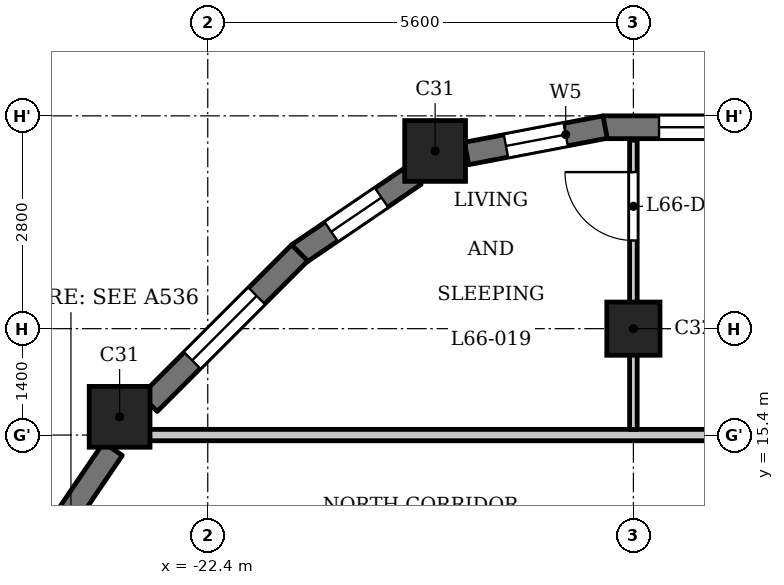
"""IFC4 building model, lengths in metres.
Left out: names, types, materials, properties, quantities, classifications, styles, units other than length and angle.
Written with IfcOpenShell. Run it as: python <this file> out.ifc"""

import sys

from ifc_helpers import new_model, si_unit, direction, frame, frame_2d, origin, origin_2d, place, context, subcontext, project, spatial, rectangle, extrude, element, fill, save


model = new_model("IFC4")
c1 = context("Model", 3, precision=1e-05, world=origin(), true_north=direction((0.0, 1.0)))
c2 = subcontext(c1, "Body", "Model", "MODEL_VIEW")
j1 = project(units=[si_unit("LENGTHUNIT", "METRE"), si_unit("PLANEANGLEUNIT", "RADIAN")], contexts=[c1])
p1 = place(None, origin())
s1 = spatial("IfcSite", under=j1, at=p1, CompositionType="ELEMENT")
p2 = place(p1, origin())
s2 = spatial("IfcBuilding", under=s1, at=p2, CompositionType="ELEMENT")
p3 = place(p2, frame((0.0, 0.0, 255.7)))
s3 = spatial("IfcBuildingStorey", under=s2, at=p3, CompositionType="ELEMENT", Elevation=255.7)
for number, where, z_axis, x_axis in (
    (1, (-19.409, 19.138, 0.0), (0.0, 0.0, 1.0), (1.0, 0.0, 0.0)),
    (2, (-23.56, 15.64, 0.0), (0.0, 0.0, 1.0), (1.0, 0.0, 0.0)),
):
    element("IfcColumn", number, at=place(p3, frame(where, z_axis=z_axis, x_axis=x_axis)), inside=s3, PredefinedType="COLUMN", context=c2, shape_type="SweptSolid", body=[
        extrude(rectangle(XDim=0.8, YDim=0.8, at=origin_2d()), origin(), (0.0, 0.0, 1.0), 3.5),
    ])
p4 = place(p3, frame((-16.8, 16.8, 0.0), z_axis=(0.0, 0.0, 1.0), x_axis=(1.0, 0.0, 0.0)))
e3 = element("IfcColumn", 3, at=p4, inside=s3, PredefinedType="COLUMN", context=c2, shape_type="SweptSolid", body=[
    extrude(rectangle(XDim=0.7, YDim=0.7, at=origin_2d()), origin(), (0.0, 0.0, 1.0), 3.5),
])
p5 = place(p3, frame((-14.4, 19.45, 0.0), z_axis=(0.0, 0.0, 1.0), x_axis=(-1.0, 0.0, 0.0)))
e4 = element("IfcWall", 4, at=p5, inside=s3, PredefinedType="SOLIDWALL", context=c2, shape_type="SweptSolid", body=[
    extrude(rectangle(XDim=2.8, YDim=0.3, at=frame_2d((1.4, 0.0))), origin(), (0.0, 0.0, 1.0), 2.55),
])
p6 = place(p5, frame((0.262, 0.0, 0.9)))
e5 = element("IfcOpeningElement", 5, at=p6, cuts=e4, PredefinedType="OPENING", context=c2, shape_type="SweptSolid", body=[
    extrude(rectangle(XDim=1.8, YDim=1.25, at=frame_2d((0.9, 0.625))), frame((0.0, 0.16, 0.0), z_axis=(0.0, -1.0, 0.0), x_axis=(1.0, 0.0, 0.0)), (0.0, 0.0, 1.0), 0.32),
])
p7 = place(p3, frame((-17.172, 19.453, 0.0), z_axis=(0.0, 0.0, 1.0), x_axis=(-0.982301706131, -0.187305520826, 0.0)))
e6 = element("IfcWall", 6, at=p7, inside=s3, PredefinedType="SOLIDWALL", context=c2, shape_type="SweptSolid", body=[
    extrude(rectangle(XDim=1.856, YDim=0.3, at=frame_2d((0.928, 0.0))), origin(), (0.0, 0.0, 1.0), 2.55),
])
p8 = place(p7, frame((0.528, 0.0, 0.6)))
e7 = element("IfcOpeningElement", 7, at=p8, cuts=e6, PredefinedType="OPENING", context=c2, shape_type="SweptSolid", body=[
    extrude(rectangle(XDim=0.8, YDim=1.55, at=frame_2d((0.4, 0.775))), frame((0.0, 0.16, 0.0), z_axis=(0.0, -1.0, 0.0), x_axis=(1.0, 0.0, 0.0)), (0.0, 0.0, 1.0), 0.32),
])
p9 = place(p3, frame((-19.678, 18.822, 0.0), z_axis=(0.0, 0.0, 1.0), x_axis=(-0.826997446962, -0.562205676526, 0.0)))
e8 = element("IfcWall", 8, at=p9, inside=s3, PredefinedType="SOLIDWALL", context=c2, shape_type="SweptSolid", body=[
    extrude(rectangle(XDim=1.856, YDim=0.3, at=frame_2d((0.928, 0.0))), origin(), (0.0, 0.0, 1.0), 2.55),
])
p10 = place(p9, frame((0.528, 0.0, 0.6)))
e9 = element("IfcOpeningElement", 9, at=p10, cuts=e8, PredefinedType="OPENING", context=c2, shape_type="SweptSolid", body=[
    extrude(rectangle(XDim=0.8, YDim=1.55, at=frame_2d((0.4, 0.775))), frame((0.0, 0.16, 0.0), z_axis=(0.0, -1.0, 0.0), x_axis=(1.0, 0.0, 0.0)), (0.0, 0.0, 1.0), 0.32),
])
p11 = place(p3, frame((-21.191, 17.797, 0.0), z_axis=(0.0, 0.0, 1.0), x_axis=(-0.707106781187, -0.707106781187, 0.0)))
e10 = element("IfcWall", 10, at=p11, inside=s3, PredefinedType="SOLIDWALL", context=c2, shape_type="SweptSolid", body=[
    extrude(rectangle(XDim=2.8, YDim=0.3, at=frame_2d((1.4, 0.0))), origin(), (0.0, 0.0, 1.0), 2.55),
])
p12 = place(p11, frame((0.8, 0.0, 0.6)))
e11 = element("IfcOpeningElement", 11, at=p12, cuts=e10, PredefinedType="OPENING", context=c2, shape_type="SweptSolid", body=[
    extrude(rectangle(XDim=1.2, YDim=1.55, at=frame_2d((0.6, 0.775))), frame((0.0, 0.16, 0.0), z_axis=(0.0, -1.0, 0.0), x_axis=(1.0, 0.0, 0.0)), (0.0, 0.0, 1.0), 0.32),
])
p13 = place(p3, frame((-23.648, 15.217, 0.0), z_axis=(0.0, 0.0, 1.0), x_axis=(-0.562043265151, -0.827107833416, 0.0)))
e12 = element("IfcWall", 12, at=p13, inside=s3, PredefinedType="SOLIDWALL", context=c2, shape_type="SweptSolid", body=[
    extrude(rectangle(XDim=1.377, YDim=0.3, at=frame_2d((0.688, 0.0))), origin(), (0.0, 0.0, 1.0), 2.55),
])
p14 = place(p3, frame((-23.55, 15.4, 0.0), z_axis=(0.0, 0.0, 1.0), x_axis=(1.0, 0.0, 0.0)))
e13 = element("IfcWall", 13, at=p14, inside=s3, PredefinedType="PARTITIONING", context=c2, shape_type="SweptSolid", body=[
    extrude(rectangle(XDim=46.872, YDim=0.15, at=frame_2d((23.436, 0.0))), origin(), (0.0, 0.0, 1.0), 3.2),
])
p15 = place(p14, frame((8.05, 0.0, 0.0)))
e14 = element("IfcOpeningElement", 14, at=p15, cuts=e13, PredefinedType="OPENING", context=c2, shape_type="SweptSolid", body=[
    extrude(rectangle(XDim=1.0, YDim=2.1, at=frame_2d((0.5, 1.05))), frame((0.0, 0.085, 0.0), z_axis=(0.0, -1.0, 0.0), x_axis=(1.0, 0.0, 0.0)), (0.0, 0.0, 1.0), 0.17),
])
p16 = place(p14, frame((18.5, 0.0, 0.0)))
e15 = element("IfcOpeningElement", 15, at=p16, cuts=e13, PredefinedType="OPENING", context=c2, shape_type="SweptSolid", body=[
    extrude(rectangle(XDim=1.0, YDim=2.1, at=frame_2d((0.5, 1.05))), frame((0.0, 0.085, 0.0), z_axis=(0.0, -1.0, 0.0), x_axis=(1.0, 0.0, 0.0)), (0.0, 0.0, 1.0), 0.17),
])
p17 = place(p14, frame((30.7, 0.0, 0.0)))
e16 = element("IfcOpeningElement", 16, at=p17, cuts=e13, PredefinedType="OPENING", context=c2, shape_type="SweptSolid", body=[
    extrude(rectangle(XDim=1.0, YDim=2.1, at=frame_2d((0.5, 1.05))), frame((0.0, 0.085, 0.0), z_axis=(0.0, -1.0, 0.0), x_axis=(1.0, 0.0, 0.0)), (0.0, 0.0, 1.0), 0.17),
])
p18 = place(p14, frame((37.7, 0.0, 0.0)))
e17 = element("IfcOpeningElement", 17, at=p18, cuts=e13, PredefinedType="OPENING", context=c2, shape_type="SweptSolid", body=[
    extrude(rectangle(XDim=1.0, YDim=2.1, at=frame_2d((0.5, 1.05))), frame((0.0, 0.085, 0.0), z_axis=(0.0, -1.0, 0.0), x_axis=(1.0, 0.0, 0.0)), (0.0, 0.0, 1.0), 0.17),
])
p19 = place(p3, frame((-16.8, 15.475, 0.0), z_axis=(0.0, 0.0, 1.0), x_axis=(0.0, 1.0, 0.0)))
e18 = element("IfcWall", 18, at=p19, inside=s3, PredefinedType="PARTITIONING", context=c2, shape_type="SweptSolid", body=[
    extrude(rectangle(XDim=3.805, YDim=0.1, at=frame_2d((1.902, 0.0))), origin(), (0.0, 0.0, 1.0), 3.2),
])
p20 = place(p19, frame((2.485, 0.0, 0.0)))
e19 = element("IfcOpeningElement", 19, at=p20, cuts=e18, PredefinedType="OPENING", context=c2, shape_type="SweptSolid", body=[
    extrude(rectangle(XDim=0.9, YDim=2.1, at=frame_2d((0.45, 1.05))), frame((0.0, 0.06, 0.0), z_axis=(0.0, -1.0, 0.0), x_axis=(1.0, 0.0, 0.0)), (0.0, 0.0, 1.0), 0.12),
])
p21 = place(p20, origin())
e20 = element("IfcDoor", 20, at=p21, inside=s3, OperationType="SINGLE_SWING_LEFT", PredefinedType="DOOR", context=c2, shape_type="SweptSolid", body=[
    extrude(rectangle(XDim=0.9, YDim=2.1, at=frame_2d((0.45, 1.05))), frame((0.0, 0.025, 0.0), z_axis=(0.0, -1.0, 0.0), x_axis=(1.0, 0.0, 0.0)), (0.0, 0.0, 1.0), 0.05),
])
fill(e19, e20)
p22 = place(p6, origin())
e21 = element("IfcWindow", 21, at=p22, inside=s3, PartitioningType="SINGLE_PANEL", PredefinedType="WINDOW", context=c2, shape_type="SweptSolid", body=[
    extrude(rectangle(XDim=1.8, YDim=1.25, at=frame_2d((0.9, 0.625))), frame((0.0, 0.03, 0.0), z_axis=(0.0, -1.0, 0.0), x_axis=(1.0, 0.0, 0.0)), (0.0, 0.0, 1.0), 0.06),
])
fill(e5, e21)
p23 = place(p8, origin())
e22 = element("IfcWindow", 22, at=p23, inside=s3, PartitioningType="SINGLE_PANEL", PredefinedType="WINDOW", context=c2, shape_type="SweptSolid", body=[
    extrude(rectangle(XDim=0.8, YDim=1.55, at=frame_2d((0.4, 0.775))), frame((0.0, 0.03, 0.0), z_axis=(0.0, -1.0, 0.0), x_axis=(1.0, 0.0, 0.0)), (0.0, 0.0, 1.0), 0.06),
])
fill(e7, e22)
p24 = place(p10, origin())
e23 = element("IfcWindow", 23, at=p24, inside=s3, PartitioningType="SINGLE_PANEL", PredefinedType="WINDOW", context=c2, shape_type="SweptSolid", body=[
    extrude(rectangle(XDim=0.8, YDim=1.55, at=frame_2d((0.4, 0.775))), frame((0.0, 0.03, 0.0), z_axis=(0.0, -1.0, 0.0), x_axis=(1.0, 0.0, 0.0)), (0.0, 0.0, 1.0), 0.06),
])
fill(e9, e23)
p25 = place(p12, origin())
e24 = element("IfcWindow", 24, at=p25, inside=s3, PartitioningType="SINGLE_PANEL", PredefinedType="WINDOW", context=c2, shape_type="SweptSolid", body=[
    extrude(rectangle(XDim=1.2, YDim=1.55, at=frame_2d((0.6, 0.775))), frame((0.0, 0.03, 0.0), z_axis=(0.0, -1.0, 0.0), x_axis=(1.0, 0.0, 0.0)), (0.0, 0.0, 1.0), 0.06),
])
fill(e11, e24)
save(model, sys.argv[1])
